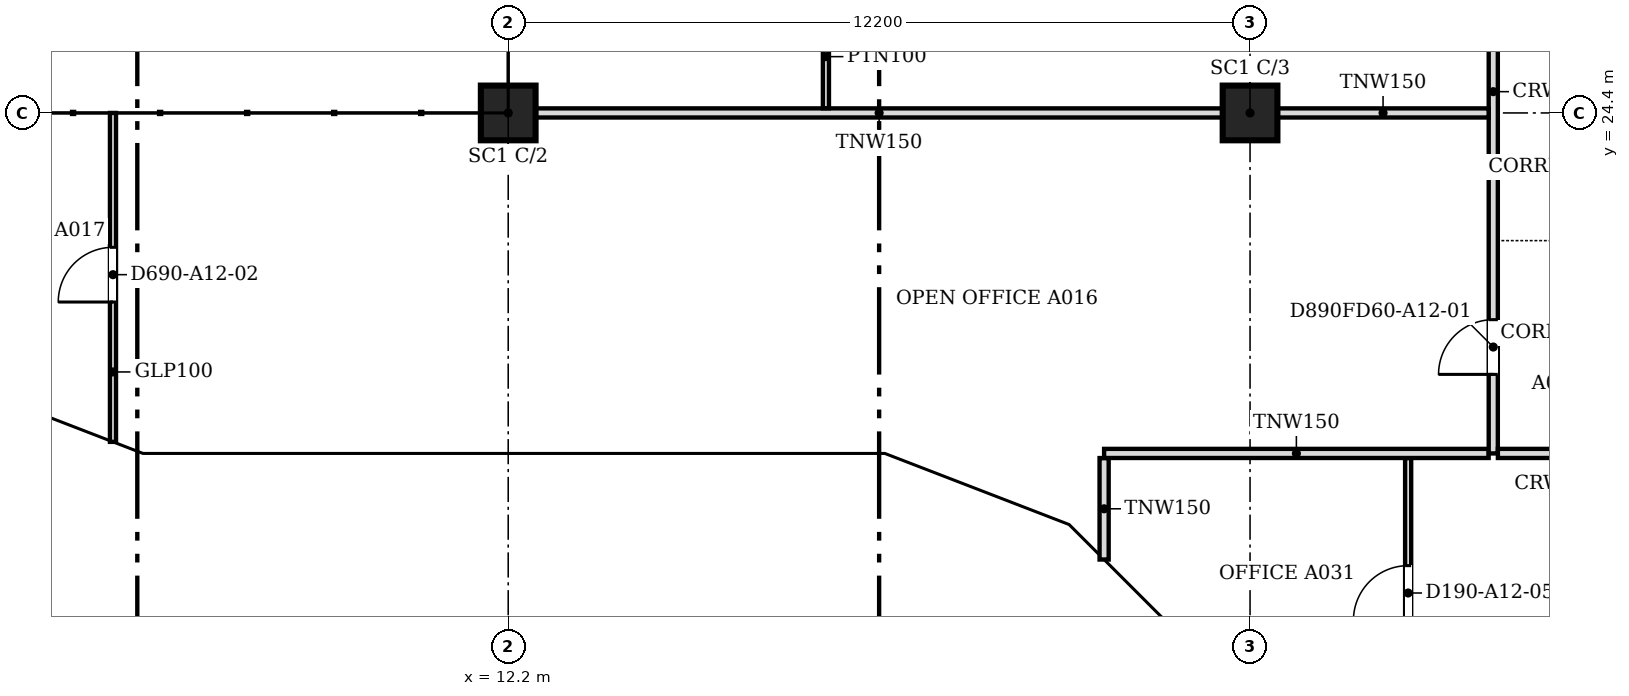
"""IFC4 building model, lengths in metres.
Left out: names, types, materials, properties, quantities, classifications, styles, units other than length and angle.
Written with IfcOpenShell. Run it as: python <this file> out.ifc"""

import sys

from ifc_helpers import new_model, si_unit, direction, frame, frame_2d, origin, origin_2d, place, context, subcontext, project, spatial, polyline, rectangle, outline, extrude, faceted_brep, source, transform, mapped, element, fill, save


model = new_model("IFC4")
c1 = context("Model", 3, precision=1e-05, world=origin(), true_north=direction((0.0, 1.0)))
c2 = subcontext(c1, "Body", "Model", "MODEL_VIEW")
j1 = project(units=[si_unit("LENGTHUNIT", "METRE"), si_unit("PLANEANGLEUNIT", "RADIAN")], contexts=[c1])
p1 = place(None, origin())
s1 = spatial("IfcSite", under=j1, at=p1, CompositionType="ELEMENT")
p2 = place(p1, origin())
s2 = spatial("IfcBuilding", under=s1, at=p2, CompositionType="ELEMENT")
p3 = place(p2, frame((0.0, 0.0, 139.2)))
s3 = spatial("IfcBuildingStorey", under=s2, at=p3, CompositionType="ELEMENT", Elevation=139.2)
for number, where, z_axis, x_axis in (
    (1, (12.2, 24.4, 0.0), (0.0, 0.0, 1.0), (1.0, 0.0, 0.0)),
    (2, (24.4, 24.4, 0.0), (0.0, 0.0, 1.0), (1.0, 0.0, 0.0)),
):
    element("IfcColumn", number, at=place(p3, frame(where, z_axis=z_axis, x_axis=x_axis)), inside=s3, PredefinedType="COLUMN", context=c2, shape_type="SweptSolid", body=[
        extrude(rectangle(XDim=0.9, YDim=0.9, at=origin_2d()), origin(), (0.0, 0.0, 1.0), 3.6),
    ])
m1 = source(origin(), c2, "Body", "Brep", [
    faceted_brep([(0.053, -0.25, 0.0), (3.003, -0.25, 3.8), (0.053, -0.25, 7.6), (0.0, -0.25, 7.532), (0.0, -0.25, 0.068), (0.106, 0.25, 7.532), (2.957, 0.25, 3.86), (2.957, 0.25, 3.74), (0.106, 0.25, 0.068), (3.003, 0.0, 3.8), (0.053, 0.0, 0.0), (0.053, 0.0, 7.6)], [[[0, 1, 2, 3, 4]], [[5, 6, 7, 8]], [[8, 7, 9, 1, 0, 10]], [[6, 5, 11, 2, 1, 9]], [[3, 2, 11]], [[10, 0, 4]], [[8, 10, 4, 3, 11, 5]], [[9, 7, 6]]]),
])
p4 = place(p3, frame((3.344, 19.631, -3.8), z_axis=(0.0, 0.0, 1.0), x_axis=(0.933007896601, -0.359855894603, 0.0)))
e3 = element("IfcWall", 3, at=p4, inside=s3, PredefinedType="SOLIDWALL", context=c2, shape_type="MappedRepresentation", body=[
    mapped(m1, transform((0.0, 0.0, 0.0), scale=1.0)),
])
m2 = source(origin(), c2, "Body", "SweptSolid", [
    extrude(outline(polyline([(0.253, 0.665), (2.687, 3.8), (0.253, 6.935), (0.253, 0.665)])), frame((0.0, 0.26, 0.0), z_axis=(0.0, -1.0, 0.0), x_axis=(1.0, 0.0, 0.0)), (0.0, 0.0, 1.0), 0.52),
])
p5 = place(p4, origin())
e4 = element("IfcOpeningElement", 4, at=p5, cuts=e3, PredefinedType="OPENING", context=c2, shape_type="MappedRepresentation", body=[
    mapped(m2, transform((0.0, 0.0, 0.0), scale=1.0)),
])
m3 = source(origin(), c2, "Body", "Brep", [
    faceted_brep([(3.003, -0.25, 0.0), (6.053, -0.25, 3.8), (3.003, -0.25, 7.6), (0.0, -0.25, 3.8), (0.047, 0.25, 3.859), (3.003, 0.25, 7.6), (6.053, 0.25, 3.8), (3.003, 0.25, 0.0), (0.047, 0.25, 3.741), (0.0, 0.0, 3.8)], [[[0, 1, 2, 3]], [[4, 5, 6, 7, 8]], [[7, 6, 1, 0]], [[6, 5, 2, 1]], [[5, 4, 9, 3, 2]], [[8, 7, 0, 3, 9]], [[8, 9, 4]]]),
])
p6 = place(p3, frame((6.146, 18.55, -3.8), z_axis=(0.0, 0.0, 1.0), x_axis=(1.0, 0.0, 0.0)))
e5 = element("IfcWall", 5, at=p6, inside=s3, PredefinedType="SOLIDWALL", context=c2, shape_type="MappedRepresentation", body=[
    mapped(m3, transform((0.0, 0.0, 0.0), scale=1.0)),
])
m4 = source(origin(), c2, "Body", "SweptSolid", [
    extrude(outline(polyline([(3.005, 0.401), (5.733, 3.8), (3.005, 7.199), (0.319, 3.8), (3.005, 0.401)])), frame((0.0, 0.26, 0.0), z_axis=(0.0, -1.0, 0.0), x_axis=(1.0, 0.0, 0.0)), (0.0, 0.0, 1.0), 0.52),
])
p7 = place(p6, origin())
e6 = element("IfcOpeningElement", 6, at=p7, cuts=e5, PredefinedType="OPENING", context=c2, shape_type="MappedRepresentation", body=[
    mapped(m4, transform((0.0, 0.0, 0.0), scale=1.0)),
])
m5 = source(origin(), c2, "Body", "Brep", [
    faceted_brep([(3.05, -0.25, 0.0), (6.1, -0.25, 3.743), (6.1, -0.25, 3.857), (3.05, -0.25, 7.6), (0.0, -0.25, 3.8), (0.0, 0.25, 3.8), (3.05, 0.25, 7.6), (6.146, 0.25, 3.8), (3.05, 0.25, 0.0), (6.146, -0.0, 3.8)], [[[0, 1, 2, 3, 4]], [[5, 6, 7, 8]], [[8, 7, 9, 1, 0]], [[7, 6, 3, 2, 9]], [[6, 5, 4, 3]], [[5, 8, 0, 4]], [[1, 9, 2]]]),
])
p8 = place(p3, frame((12.2, 18.55, -3.8), z_axis=(0.0, 0.0, 1.0), x_axis=(1.0, 0.0, 0.0)))
e7 = element("IfcWall", 7, at=p8, inside=s3, PredefinedType="SOLIDWALL", context=c2, shape_type="MappedRepresentation", body=[
    mapped(m5, transform((0.0, 0.0, 0.0), scale=1.0)),
])
m6 = source(origin(), c2, "Body", "SweptSolid", [
    extrude(outline(polyline([(3.052, 0.398), (5.824, 3.8), (3.052, 7.203), (0.321, 3.8), (3.052, 0.398)])), frame((0.0, 0.26, 0.0), z_axis=(0.0, -1.0, 0.0), x_axis=(1.0, 0.0, 0.0)), (0.0, 0.0, 1.0), 0.52),
])
p9 = place(p8, origin())
e8 = element("IfcOpeningElement", 8, at=p9, cuts=e7, PredefinedType="OPENING", context=c2, shape_type="MappedRepresentation", body=[
    mapped(m6, transform((0.0, 0.0, 0.0), scale=1.0)),
])
m7 = source(origin(), c2, "Body", "Brep", [
    faceted_brep([(3.096, -0.25, 7.536), (0.047, -0.25, 3.856), (0.047, -0.25, 3.744), (3.096, -0.25, 0.064), (0.0, 0.25, 3.8), (3.149, 0.25, 7.6), (3.202, 0.25, 7.536), (3.202, 0.25, 0.064), (3.149, 0.25, 0.0), (3.149, -0.0, 0.0), (3.149, -0.0, 7.6), (0.0, 0.0, 3.8)], [[[0, 1, 2, 3]], [[4, 5, 6, 7, 8]], [[8, 7, 9]], [[6, 5, 10]], [[5, 4, 11, 1, 0, 10]], [[4, 8, 9, 3, 2, 11]], [[11, 2, 1]], [[3, 9, 7, 6, 10, 0]]]),
])
p10 = place(p3, frame((18.346, 18.55, -3.8), z_axis=(0.0, 0.0, 1.0), x_axis=(0.932985567668, -0.359913782069, 0.0)))
e9 = element("IfcWall", 9, at=p10, inside=s3, PredefinedType="SOLIDWALL", context=c2, shape_type="MappedRepresentation", body=[
    mapped(m7, transform((0.0, 0.0, 0.0), scale=1.0)),
])
m8 = source(origin(), c2, "Body", "SweptSolid", [
    extrude(outline(polyline([(2.949, 6.967), (0.325, 3.8), (2.949, 0.633), (2.949, 6.967)])), frame((0.0, 0.26, 0.0), z_axis=(0.0, -1.0, 0.0), x_axis=(1.0, 0.0, 0.0)), (0.0, 0.0, 1.0), 0.52),
])
p11 = place(p10, origin())
e10 = element("IfcOpeningElement", 10, at=p11, cuts=e9, PredefinedType="OPENING", context=c2, shape_type="MappedRepresentation", body=[
    mapped(m8, transform((0.0, 0.0, 0.0), scale=1.0)),
])
m9 = source(origin(), c2, "Body", "Brep", [
    faceted_brep([(0.106, -0.25, 0.064), (3.156, -0.25, 3.736), (3.156, -0.25, 3.864), (0.106, -0.25, 7.536), (0.0, 0.25, 7.536), (0.053, 0.25, 7.6), (3.209, 0.25, 3.8), (0.053, 0.25, 0.0), (0.0, 0.25, 0.064), (3.209, -0.0, 3.8), (0.053, 0.0, 0.0), (0.053, 0.0, 7.6)], [[[0, 1, 2, 3]], [[4, 5, 6, 7, 8]], [[7, 6, 9, 1, 0, 10]], [[6, 5, 11, 3, 2, 9]], [[5, 4, 11]], [[8, 7, 10]], [[8, 10, 0, 3, 11, 4]], [[1, 9, 2]]]),
])
p12 = place(p3, frame((21.248, 17.454, -3.8), z_axis=(0.0, 0.0, 1.0), x_axis=(0.707106781187, -0.707106781187, 0.0)))
e11 = element("IfcWall", 11, at=p12, inside=s3, PredefinedType="SOLIDWALL", context=c2, shape_type="MappedRepresentation", body=[
    mapped(m9, transform((0.0, 0.0, 0.0), scale=1.0)),
])
m10 = source(origin(), c2, "Body", "SweptSolid", [
    extrude(outline(polyline([(0.253, 0.632), (2.884, 3.8), (0.253, 6.968), (0.253, 0.632)])), frame((0.0, 0.26, 0.0), z_axis=(0.0, -1.0, 0.0), x_axis=(1.0, 0.0, 0.0)), (0.0, 0.0, 1.0), 0.52),
])
p13 = place(p12, origin())
e12 = element("IfcOpeningElement", 12, at=p13, cuts=e11, PredefinedType="OPENING", context=c2, shape_type="MappedRepresentation", body=[
    mapped(m10, transform((0.0, 0.0, 0.0), scale=1.0)),
])
p14 = place(p2, frame((0.0, 0.0, 143.0)))
s4 = spatial("IfcBuildingStorey", under=s2, at=p14, CompositionType="ELEMENT", Elevation=143.0)
m11 = source(origin(), c2, "Body", "Brep", [
    faceted_brep([(2.95, -0.25, 0.0), (2.997, -0.25, 0.059), (2.997, -0.25, 7.541), (2.95, -0.25, 7.6), (0.0, -0.25, 3.8), (0.053, 0.25, 3.868), (2.904, 0.25, 7.54), (2.904, 0.25, 0.06), (0.053, 0.25, 3.732), (2.95, 0.0, 0.0), (2.95, 0.0, 7.6), (0.0, 0.0, 3.8)], [[[0, 1, 2, 3, 4]], [[5, 6, 7, 8]], [[1, 0, 9]], [[10, 3, 2]], [[6, 5, 11, 4, 3, 10]], [[8, 7, 9, 0, 4, 11]], [[8, 11, 5]], [[1, 9, 7, 6, 10, 2]]]),
])
p15 = place(p14, frame((3.394, 19.612, -3.8), z_axis=(0.0, 0.0, 1.0), x_axis=(0.932990326376, -0.359901446078, 0.0)))
e13 = element("IfcWall", 13, at=p15, inside=s4, PredefinedType="SOLIDWALL", context=c2, shape_type="MappedRepresentation", body=[
    mapped(m11, transform((0.0, 0.0, 0.0), scale=1.0)),
])
m12 = source(origin(), c2, "Body", "SweptSolid", [
    extrude(outline(polyline([(2.75, 6.935), (0.316, 3.8), (2.75, 0.665), (2.75, 6.935)])), frame((0.0, 0.26, 0.0), z_axis=(0.0, -1.0, 0.0), x_axis=(1.0, 0.0, 0.0)), (0.0, 0.0, 1.0), 0.52),
])
p16 = place(p15, origin())
e14 = element("IfcOpeningElement", 14, at=p16, cuts=e13, PredefinedType="OPENING", context=c2, shape_type="MappedRepresentation", body=[
    mapped(m12, transform((0.0, 0.0, 0.0), scale=1.0)),
])
m13 = source(origin(), c2, "Body", "Brep", [
    faceted_brep([(0.047, -0.25, 0.0), (3.05, -0.25, 3.8), (0.047, -0.25, 7.6), (0.0, -0.25, 7.54), (0.0, -0.25, 0.06), (0.093, 0.25, 7.541), (3.05, 0.25, 3.8), (0.093, 0.25, 0.059), (0.047, 0.0, 0.0), (0.047, 0.0, 7.6)], [[[0, 1, 2, 3, 4]], [[5, 6, 7]], [[7, 6, 1, 0, 8]], [[6, 5, 9, 2, 1]], [[3, 2, 9]], [[8, 0, 4]], [[7, 8, 4, 3, 9, 5]]]),
])
p17 = place(p14, frame((6.1, 18.55, -3.8), z_axis=(0.0, 0.0, 1.0), x_axis=(1.0, 0.0, 0.0)))
e15 = element("IfcWall", 15, at=p17, inside=s4, PredefinedType="SOLIDWALL", context=c2, shape_type="MappedRepresentation", body=[
    mapped(m13, transform((0.0, 0.0, 0.0), scale=1.0)),
])
m14 = source(origin(), c2, "Body", "SweptSolid", [
    extrude(outline(polyline([(0.247, 0.656), (2.731, 3.8), (0.247, 6.944), (0.247, 0.656)])), frame((0.0, 0.26, 0.0), z_axis=(0.0, -1.0, 0.0), x_axis=(1.0, 0.0, 0.0)), (0.0, 0.0, 1.0), 0.52),
])
p18 = place(p17, origin())
e16 = element("IfcOpeningElement", 16, at=p18, cuts=e15, PredefinedType="OPENING", context=c2, shape_type="MappedRepresentation", body=[
    mapped(m14, transform((0.0, 0.0, 0.0), scale=1.0)),
])
m15 = source(origin(), c2, "Body", "SweptSolid", [
    extrude(outline(polyline([(3.05, 0.0), (6.1, 3.8), (3.05, 7.6), (0.0, 3.8), (3.05, 0.0)])), frame((0.0, 0.25, 0.0), z_axis=(0.0, -1.0, 0.0), x_axis=(1.0, 0.0, 0.0)), (0.0, 0.0, 1.0), 0.5),
])
p19 = place(p14, frame((9.15, 18.55, -3.8), z_axis=(0.0, 0.0, 1.0), x_axis=(1.0, 0.0, 0.0)))
e17 = element("IfcWall", 17, at=p19, inside=s4, PredefinedType="SOLIDWALL", context=c2, shape_type="MappedRepresentation", body=[
    mapped(m15, transform((0.0, 0.0, 0.0), scale=1.0)),
])
m16 = source(origin(), c2, "Body", "SweptSolid", [
    extrude(outline(polyline([(3.05, 0.399), (5.78, 3.8), (3.05, 7.201), (0.321, 3.8), (3.05, 0.399)])), frame((0.0, 0.26, 0.0), z_axis=(0.0, -1.0, 0.0), x_axis=(1.0, 0.0, 0.0)), (0.0, 0.0, 1.0), 0.52),
])
p20 = place(p19, origin())
e18 = element("IfcOpeningElement", 18, at=p20, cuts=e17, PredefinedType="OPENING", context=c2, shape_type="MappedRepresentation", body=[
    mapped(m16, transform((0.0, 0.0, 0.0), scale=1.0)),
])
m17 = source(origin(), c2, "Body", "Brep", [
    faceted_brep([(3.05, -0.25, 7.543), (0.0, -0.25, 3.8), (3.05, -0.25, 0.057), (0.0, 0.25, 3.8), (3.096, 0.25, 7.6), (3.143, 0.25, 7.544), (3.143, 0.25, 0.056), (3.096, 0.25, 0.0), (3.096, -0.0, 0.0), (3.096, -0.0, 7.6)], [[[0, 1, 2]], [[3, 4, 5, 6, 7]], [[7, 6, 8]], [[5, 4, 9]], [[4, 3, 1, 0, 9]], [[3, 7, 8, 2, 1]], [[2, 8, 6, 5, 9, 0]]]),
])
p21 = place(p14, frame((15.25, 18.55, -3.8), z_axis=(0.0, 0.0, 1.0), x_axis=(1.0, 0.0, 0.0)))
e19 = element("IfcWall", 19, at=p21, inside=s4, PredefinedType="SOLIDWALL", context=c2, shape_type="MappedRepresentation", body=[
    mapped(m17, transform((0.0, 0.0, 0.0), scale=1.0)),
])
m18 = source(origin(), c2, "Body", "SweptSolid", [
    extrude(outline(polyline([(2.896, 6.959), (0.323, 3.8), (2.896, 0.641), (2.896, 6.959)])), frame((0.0, 0.26, 0.0), z_axis=(0.0, -1.0, 0.0), x_axis=(1.0, 0.0, 0.0)), (0.0, 0.0, 1.0), 0.52),
])
p22 = place(p21, origin())
e20 = element("IfcOpeningElement", 20, at=p22, cuts=e19, PredefinedType="OPENING", context=c2, shape_type="MappedRepresentation", body=[
    mapped(m18, transform((0.0, 0.0, 0.0), scale=1.0)),
])
m19 = source(origin(), c2, "Body", "Brep", [
    faceted_brep([(0.093, -0.25, 0.056), (3.143, -0.25, 3.736), (3.143, -0.25, 3.864), (0.093, -0.25, 7.544), (0.0, 0.25, 7.543), (0.047, 0.25, 7.6), (3.196, 0.25, 3.8), (0.047, 0.25, 0.0), (0.0, 0.25, 0.057), (3.196, -0.0, 3.8), (0.047, 0.0, 0.0), (0.047, 0.0, 7.6)], [[[0, 1, 2, 3]], [[4, 5, 6, 7, 8]], [[7, 6, 9, 1, 0, 10]], [[6, 5, 11, 3, 2, 9]], [[5, 4, 11]], [[8, 7, 10]], [[8, 10, 0, 3, 11, 4]], [[1, 9, 2]]]),
])
p23 = place(p14, frame((18.303, 18.567, -3.8), z_axis=(0.0, 0.0, 1.0), x_axis=(0.932978940178, -0.359930961693, 0.0)))
e21 = element("IfcWall", 21, at=p23, inside=s4, PredefinedType="SOLIDWALL", context=c2, shape_type="MappedRepresentation", body=[
    mapped(m19, transform((0.0, 0.0, 0.0), scale=1.0)),
])
m20 = source(origin(), c2, "Body", "SweptSolid", [
    extrude(outline(polyline([(0.247, 0.633), (2.871, 3.8), (0.247, 6.967), (0.247, 0.633)])), frame((0.0, 0.26, 0.0), z_axis=(0.0, -1.0, 0.0), x_axis=(1.0, 0.0, 0.0)), (0.0, 0.0, 1.0), 0.52),
])
p24 = place(p23, origin())
e22 = element("IfcOpeningElement", 22, at=p24, cuts=e21, PredefinedType="OPENING", context=c2, shape_type="MappedRepresentation", body=[
    mapped(m20, transform((0.0, 0.0, 0.0), scale=1.0)),
])
m21 = source(origin(), c2, "Body", "Brep", [
    faceted_brep([(3.103, -0.25, 7.536), (0.053, -0.25, 3.864), (0.053, -0.25, 3.736), (3.103, -0.25, 0.064), (0.0, 0.25, 3.8), (3.156, 0.25, 7.6), (3.209, 0.25, 7.536), (3.209, 0.25, 0.064), (3.156, 0.25, 0.0), (3.156, -0.0, 0.0), (3.156, -0.0, 7.6), (0.0, 0.0, 3.8)], [[[0, 1, 2, 3]], [[4, 5, 6, 7, 8]], [[8, 7, 9]], [[6, 5, 10]], [[5, 4, 11, 1, 0, 10]], [[4, 8, 9, 3, 2, 11]], [[11, 2, 1]], [[3, 9, 7, 6, 10, 0]]]),
])
p25 = place(p14, frame((21.285, 17.417, -3.8), z_axis=(0.0, 0.0, 1.0), x_axis=(0.707106781187, -0.707106781187, 0.0)))
e23 = element("IfcWall", 23, at=p25, inside=s4, PredefinedType="SOLIDWALL", context=c2, shape_type="MappedRepresentation", body=[
    mapped(m21, transform((0.0, 0.0, 0.0), scale=1.0)),
])
m22 = source(origin(), c2, "Body", "SweptSolid", [
    extrude(outline(polyline([(2.956, 6.968), (0.325, 3.8), (2.956, 0.632), (2.956, 6.968)])), frame((0.0, 0.26, 0.0), z_axis=(0.0, -1.0, 0.0), x_axis=(1.0, 0.0, 0.0)), (0.0, 0.0, 1.0), 0.52),
])
p26 = place(p25, origin())
e24 = element("IfcOpeningElement", 24, at=p26, cuts=e23, PredefinedType="OPENING", context=c2, shape_type="MappedRepresentation", body=[
    mapped(m22, transform((0.0, 0.0, 0.0), scale=1.0)),
])
p27 = place(p3, frame((27.0, 10.276, 0.0), z_axis=(0.0, 0.0, 1.0), x_axis=(0.0, 1.0, 0.0)))
e25 = element("IfcWall", 25, at=p27, inside=s3, PredefinedType="PARTITIONING", context=c2, shape_type="SweptSolid", body=[
    extrude(rectangle(XDim=8.448, YDim=0.1, at=frame_2d((4.224, 0.0))), origin(), (0.0, 0.0, 1.0), 3.067),
])
m23 = source(origin(), c2, "Body", "SweptSolid", [
    extrude(rectangle(XDim=0.9, YDim=2.1, at=frame_2d((0.45, 1.05))), frame((0.0, 0.06, 0.0), z_axis=(0.0, -1.0, 0.0), x_axis=(1.0, 0.0, 0.0)), (0.0, 0.0, 1.0), 0.12),
])
p28 = place(p27, frame((1.6, 0.0, 0.0)))
e26 = element("IfcOpeningElement", 26, at=p28, cuts=e25, PredefinedType="OPENING", context=c2, shape_type="MappedRepresentation", body=[
    mapped(m23, transform((0.0, 0.0, 0.0), scale=1.0)),
])
p29 = place(p27, frame((5.779, 0.0, 0.0)))
e27 = element("IfcOpeningElement", 27, at=p29, cuts=e25, PredefinedType="OPENING", context=c2, shape_type="MappedRepresentation", body=[
    mapped(m23, transform((0.0, 0.0, 0.0), scale=1.0)),
])
p30 = place(p3, frame((22.0, 17.055, 0.0), z_axis=(0.0, 0.0, 1.0), x_axis=(0.0, 1.0, 0.0)))
e28 = element("IfcWall", 28, at=p30, inside=s3, PredefinedType="PARTITIONING", context=c2, shape_type="SweptSolid", body=[
    extrude(rectangle(XDim=1.669, YDim=0.15, at=frame_2d((0.834, 0.0))), origin(), (0.0, 0.0, 1.0), 3.067),
])
p31 = place(p3, frame((22.0, 18.8, 0.0), z_axis=(0.0, 0.0, 1.0), x_axis=(1.0, 0.0, 0.0)))
e29 = element("IfcWall", 29, at=p31, inside=s3, PredefinedType="PARTITIONING", context=c2, shape_type="SweptSolid", body=[
    extrude(rectangle(XDim=6.324, YDim=0.15, at=frame_2d((3.162, 0.0))), origin(), (0.0, 0.0, 1.0), 3.067),
])
p32 = place(p3, frame((28.4, 18.8, 0.0), z_axis=(0.0, 0.0, 1.0), x_axis=(0.0, 1.0, 0.0)))
e30 = element("IfcWall", 30, at=p32, inside=s3, PredefinedType="PARTITIONING", context=c2, shape_type="SweptSolid", body=[
    extrude(rectangle(XDim=26.824, YDim=0.15, at=frame_2d((13.412, 0.0))), origin(), (0.0, 0.0, 1.0), 3.067),
])
m24 = source(origin(), c2, "Body", "SweptSolid", [
    extrude(rectangle(XDim=0.9, YDim=2.1, at=frame_2d((0.45, 1.05))), frame((0.0, 0.085, 0.0), z_axis=(0.0, -1.0, 0.0), x_axis=(1.0, 0.0, 0.0)), (0.0, 0.0, 1.0), 0.17),
])
p33 = place(p32, frame((1.3, 0.0, 0.0)))
e31 = element("IfcOpeningElement", 31, at=p33, cuts=e30, PredefinedType="OPENING", context=c2, shape_type="MappedRepresentation", body=[
    mapped(m24, transform((0.0, 0.0, 0.0), scale=1.0)),
])
p34 = place(p32, frame((23.351, 0.0, 0.0)))
e32 = element("IfcOpeningElement", 32, at=p34, cuts=e30, PredefinedType="OPENING", context=c2, shape_type="MappedRepresentation", body=[
    mapped(m24, transform((0.0, 0.0, 0.0), scale=1.0)),
])
p35 = place(p32, frame((17.351, 0.0, 0.0)))
e33 = element("IfcOpeningElement", 33, at=p35, cuts=e30, PredefinedType="OPENING", context=c2, shape_type="MappedRepresentation", body=[
    mapped(m24, transform((0.0, 0.0, 0.0), scale=1.0)),
])
p36 = place(p32, frame((9.7, 0.0, 0.0)))
e34 = element("IfcOpeningElement", 34, at=p36, cuts=e30, PredefinedType="OPENING", context=c2, shape_type="MappedRepresentation", body=[
    mapped(m24, transform((0.0, 0.0, 0.0), scale=1.0)),
])
p37 = place(p3, frame((28.476, 18.8, 0.0), z_axis=(0.0, 0.0, 1.0), x_axis=(1.0, 0.0, 0.0)))
e35 = element("IfcWall", 35, at=p37, inside=s3, PredefinedType="PARTITIONING", context=c2, shape_type="SweptSolid", body=[
    extrude(rectangle(XDim=1.948, YDim=0.15, at=frame_2d((0.974, 0.0))), origin(), (0.0, 0.0, 1.0), 3.067),
])
p38 = place(p3, frame((5.7, 18.99, 0.0), z_axis=(0.0, 0.0, 1.0), x_axis=(0.0, 1.0, 0.0)))
e36 = element("IfcWall", 36, at=p38, inside=s3, PredefinedType="PARTITIONING", context=c2, shape_type="SweptSolid", body=[
    extrude(rectangle(XDim=5.41, YDim=0.1, at=frame_2d((2.705, 0.0))), origin(), (0.0, 0.0, 1.0), 3.067),
])
p39 = place(p38, frame((2.3, 0.0, 0.0)))
e37 = element("IfcOpeningElement", 37, at=p39, cuts=e36, PredefinedType="OPENING", context=c2, shape_type="MappedRepresentation", body=[
    mapped(m23, transform((0.0, 0.0, 0.0), scale=1.0)),
])
p40 = place(p3, frame((12.651, 24.4, 0.0), z_axis=(0.0, 0.0, 1.0), x_axis=(1.0, 0.0, 0.0)))
e38 = element("IfcWall", 38, at=p40, inside=s3, PredefinedType="PARTITIONING", context=c2, shape_type="SweptSolid", body=[
    extrude(rectangle(XDim=11.298, YDim=0.15, at=frame_2d((5.649, 0.0))), origin(), (0.0, 0.0, 1.0), 3.067),
])
p41 = place(p3, frame((24.851, 24.4, 0.0), z_axis=(0.0, 0.0, 1.0), x_axis=(1.0, 0.0, 0.0)))
e39 = element("IfcWall", 39, at=p41, inside=s3, PredefinedType="PARTITIONING", context=c2, shape_type="SweptSolid", body=[
    extrude(rectangle(XDim=3.473, YDim=0.15, at=frame_2d((1.736, 0.0))), origin(), (0.0, 0.0, 1.0), 3.067),
])
p42 = place(p3, frame((17.425, 24.476, 0.0), z_axis=(0.0, 0.0, 1.0), x_axis=(0.0, 1.0, 0.0)))
e40 = element("IfcWall", 40, at=p42, inside=s3, PredefinedType="PARTITIONING", context=c2, shape_type="SweptSolid", body=[
    extrude(rectangle(XDim=4.293, YDim=0.1, at=frame_2d((2.146, 0.0))), origin(), (0.0, 0.0, 1.0), 3.067),
])
p43 = place(p42, frame((1.7, 0.0, 0.0)))
e41 = element("IfcOpeningElement", 41, at=p43, cuts=e40, PredefinedType="OPENING", context=c2, shape_type="MappedRepresentation", body=[
    mapped(m23, transform((0.0, 0.0, 0.0), scale=1.0)),
])
m25 = source(origin(), c2, "Body", "SweptSolid", [
    extrude(rectangle(XDim=0.9, YDim=2.1, at=frame_2d((0.45, 1.05))), frame((0.0, 0.025, 0.0), z_axis=(0.0, -1.0, 0.0), x_axis=(1.0, 0.0, 0.0)), (0.0, 0.0, 1.0), 0.05),
])
p44 = place(p33, origin())
e42 = element("IfcDoor", 42, at=p44, inside=s3, OperationType="SINGLE_SWING_LEFT", PredefinedType="DOOR", context=c2, shape_type="MappedRepresentation", body=[
    mapped(m25, transform((0.0, 0.0, 0.0), scale=1.0)),
])
fill(e31, e42)
p45 = place(p29, origin())
e43 = element("IfcDoor", 43, at=p45, inside=s3, OperationType="SINGLE_SWING_LEFT", PredefinedType="DOOR", context=c2, shape_type="MappedRepresentation", body=[
    mapped(m25, transform((0.0, 0.0, 0.0), scale=1.0)),
])
fill(e27, e43)
p46 = place(p39, origin())
e44 = element("IfcDoor", 44, at=p46, inside=s3, OperationType="SINGLE_SWING_LEFT", PredefinedType="DOOR", context=c2, shape_type="MappedRepresentation", body=[
    mapped(m25, transform((0.0, 0.0, 0.0), scale=1.0)),
])
fill(e37, e44)
save(model, sys.argv[1])
